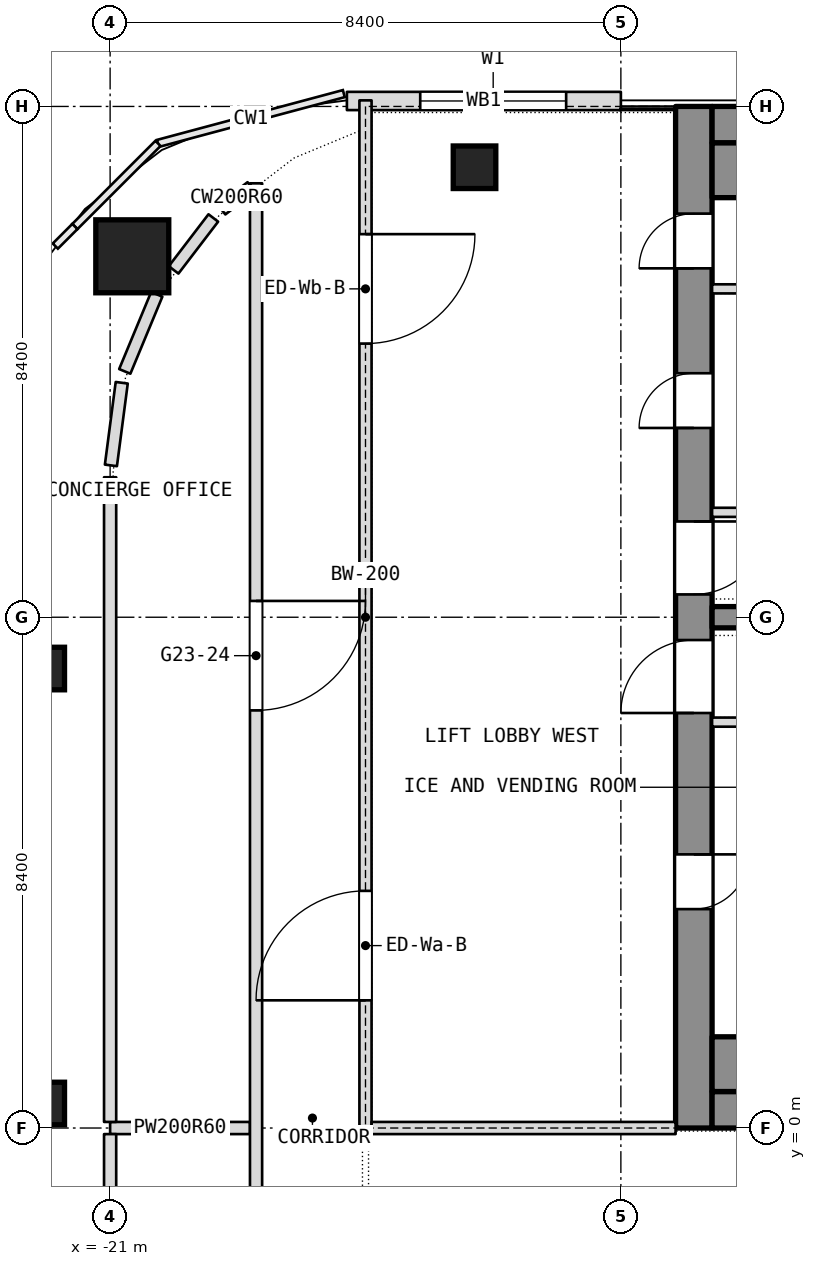
"""IFC4 building model, lengths in metres.
Left out: names, types, materials, properties, quantities, classifications, styles, units other than length and angle.
Written with IfcOpenShell. Run it as: python <this file> out.ifc"""

import sys

from ifc_helpers import new_model, si_unit, direction, frame, frame_2d, origin, origin_2d, place, context, subcontext, project, spatial, rectangle, extrude, element, fill, save


model = new_model("IFC4")
c1 = context("Model", 3, precision=1e-05, world=origin(), true_north=direction((0.0, 1.0)))
c2 = subcontext(c1, "Body", "Model", "MODEL_VIEW")
j1 = project(units=[si_unit("LENGTHUNIT", "METRE"), si_unit("PLANEANGLEUNIT", "RADIAN")], contexts=[c1])
p1 = place(None, origin())
s1 = spatial("IfcSite", under=j1, at=p1, CompositionType="ELEMENT")
p2 = place(p1, origin())
s2 = spatial("IfcBuilding", under=s1, at=p2, CompositionType="ELEMENT")
p3 = place(p2, frame((0.0, 0.0, 270.5)))
s3 = spatial("IfcBuildingStorey", under=s2, at=p3, CompositionType="ELEMENT", Elevation=270.5)
p4 = place(p3, frame((-11.4, 0.0, 0.0), z_axis=(0.0, 0.0, 1.0), x_axis=(0.0, 1.0, 0.0)))
e1 = element("IfcWall", 1, at=p4, inside=s3, PredefinedType="SHEAR", context=c2, shape_type="SweptSolid", body=[
    extrude(rectangle(XDim=16.8, YDim=0.6, at=frame_2d((8.4, 0.0))), origin(), (0.0, 0.0, 1.0), 3.6),
])
p5 = place(p4, frame((3.6, 0.0, 0.0)))
e2 = element("IfcOpeningElement", 2, at=p5, cuts=e1, PredefinedType="OPENING", context=c2, shape_type="SweptSolid", body=[
    extrude(rectangle(XDim=0.9, YDim=2.1, at=frame_2d((0.45, 1.05))), frame((0.0, 0.3, 0.0), z_axis=(0.0, -1.0, 0.0), x_axis=(1.0, 0.0, 0.0)), (0.0, 0.0, 1.0), 0.6),
])
p6 = place(p4, frame((6.825, 0.0, 0.0)))
e3 = element("IfcOpeningElement", 3, at=p6, cuts=e1, PredefinedType="OPENING", context=c2, shape_type="SweptSolid", body=[
    extrude(rectangle(XDim=1.2, YDim=2.1, at=frame_2d((0.6, 1.05))), frame((0.0, 0.3, 0.0), z_axis=(0.0, -1.0, 0.0), x_axis=(1.0, 0.0, 0.0)), (0.0, 0.0, 1.0), 0.6),
])
p7 = place(p4, frame((14.137, 0.0, 0.0)))
e4 = element("IfcOpeningElement", 4, at=p7, cuts=e1, PredefinedType="OPENING", context=c2, shape_type="SweptSolid", body=[
    extrude(rectangle(XDim=0.9, YDim=2.1, at=frame_2d((0.45, 1.05))), frame((0.0, 0.3, 0.0), z_axis=(0.0, -1.0, 0.0), x_axis=(1.0, 0.0, 0.0)), (0.0, 0.0, 1.0), 0.6),
])
p8 = place(p4, frame((11.512, 0.0, 0.0)))
e5 = element("IfcOpeningElement", 5, at=p8, cuts=e1, PredefinedType="OPENING", context=c2, shape_type="SweptSolid", body=[
    extrude(rectangle(XDim=0.9, YDim=2.1, at=frame_2d((0.45, 1.05))), frame((0.0, 0.3, 0.0), z_axis=(0.0, -1.0, 0.0), x_axis=(1.0, 0.0, 0.0)), (0.0, 0.0, 1.0), 0.6),
])
p9 = place(p4, frame((8.775, 0.0, 0.0)))
e6 = element("IfcOpeningElement", 6, at=p9, cuts=e1, PredefinedType="OPENING", context=c2, shape_type="SweptSolid", body=[
    extrude(rectangle(XDim=1.2, YDim=2.1, at=frame_2d((0.6, 1.05))), frame((0.0, 0.3, 0.0), z_axis=(0.0, -1.0, 0.0), x_axis=(1.0, 0.0, 0.0)), (0.0, 0.0, 1.0), 0.6),
])
for number, where, z_axis, x_axis in (
    (7, (-11.1, 0.3, 0.0), (0.0, 0.0, 1.0), (1.0, 0.0, 0.0)),
    (8, (-11.1, 16.5, 0.0), (0.0, 0.0, 1.0), (1.0, 0.0, 0.0)),
):
    element("IfcWall", number, at=place(p3, frame(where, z_axis=z_axis, x_axis=x_axis)), inside=s3, PredefinedType="SHEAR", context=c2, shape_type="SweptSolid", body=[
        extrude(rectangle(XDim=22.2, YDim=0.6, at=frame_2d((11.1, 0.0))), origin(), (0.0, 0.0, 1.0), 3.6),
    ])
p10 = place(p3, frame((-11.1, 8.4, 0.0), z_axis=(0.0, 0.0, 1.0), x_axis=(1.0, 0.0, 0.0)))
e9 = element("IfcWall", 9, at=p10, inside=s3, PredefinedType="SHEAR", context=c2, shape_type="SweptSolid", body=[
    extrude(rectangle(XDim=6.725, YDim=0.35, at=frame_2d((3.363, 0.0))), origin(), (0.0, 0.0, 1.0), 3.6),
])
p11 = place(p3, frame((-20.635, 14.335, 0.0), z_axis=(0.0, 0.0, 1.0), x_axis=(1.0, 0.0, 0.0)))
e10 = element("IfcColumn", 10, at=p11, inside=s3, PredefinedType="COLUMN", context=c2, shape_type="SweptSolid", body=[
    extrude(rectangle(XDim=1.2, YDim=1.2, at=origin_2d()), origin(), (0.0, 0.0, 1.0), 3.6),
])
for number, where, z_axis, x_axis in (
    (11, (-22.1, 0.403, 0.0), (0.0, 0.0, 1.0), (1.0, 0.0, 0.0)),
    (12, (-22.1, 7.556, 0.0), (0.0, 0.0, 1.0), (1.0, 0.0, 0.0)),
    (13, (-15.007, 15.8, 0.0), (0.0, 0.0, 1.0), (1.0, 0.0, 0.0)),
):
    element("IfcColumn", number, at=place(p3, frame(where, z_axis=z_axis, x_axis=x_axis)), inside=s3, PredefinedType="COLUMN", context=c2, shape_type="SweptSolid", body=[
        extrude(rectangle(XDim=0.7, YDim=0.7, at=origin_2d()), origin(), (0.0, 0.0, 1.0), 3.6),
    ])
p12 = place(p3, frame((-21.0, 0.0, 0.0), z_axis=(0.0, 0.0, 1.0), x_axis=(1.0, 0.0, 0.0)))
e14 = element("IfcWall", 14, at=p12, inside=s3, PredefinedType="PARTITIONING", context=c2, shape_type="SweptSolid", body=[
    extrude(rectangle(XDim=2.3, YDim=0.2, at=frame_2d((1.15, 0.0))), origin(), (0.0, 0.0, 1.0), 3.0),
])
p13 = place(p3, frame((-18.6, -11.8, 0.0), z_axis=(0.0, 0.0, 1.0), x_axis=(0.0, 1.0, 0.0)))
e15 = element("IfcWall", 15, at=p13, inside=s3, PredefinedType="PARTITIONING", context=c2, shape_type="SweptSolid", body=[
    extrude(rectangle(XDim=27.336, YDim=0.2, at=frame_2d((13.668, 0.0))), origin(), (0.0, 0.0, 1.0), 3.34),
])
p14 = place(p13, frame((18.668, 0.0, 0.0)))
e16 = element("IfcOpeningElement", 16, at=p14, cuts=e15, PredefinedType="OPENING", context=c2, shape_type="SweptSolid", body=[
    extrude(rectangle(XDim=1.8, YDim=2.1, at=frame_2d((0.9, 1.05))), frame((0.0, 0.1, 0.0), z_axis=(0.0, -1.0, 0.0), x_axis=(1.0, 0.0, 0.0)), (0.0, 0.0, 1.0), 0.2),
])
p15 = place(p13, frame((5.45, 0.0, 0.0)))
e17 = element("IfcOpeningElement", 17, at=p15, cuts=e15, PredefinedType="OPENING", context=c2, shape_type="SweptSolid", body=[
    extrude(rectangle(XDim=1.0, YDim=2.1, at=frame_2d((0.5, 1.05))), frame((0.0, 0.1, 0.0), z_axis=(0.0, -1.0, 0.0), x_axis=(1.0, 0.0, 0.0)), (0.0, 0.0, 1.0), 0.2),
])
p16 = place(p3, frame((-21.0, -11.6, 0.0), z_axis=(0.0, 0.0, 1.0), x_axis=(0.0, 1.0, 0.0)))
e18 = element("IfcWall", 18, at=p16, inside=s3, PredefinedType="PARTITIONING", context=c2, shape_type="SweptSolid", body=[
    extrude(rectangle(XDim=11.5, YDim=0.2, at=frame_2d((5.75, 0.0))), origin(), (0.0, 0.0, 1.0), 3.34),
])
p17 = place(p3, frame((-21.0, 0.1, 0.0), z_axis=(0.0, 0.0, 1.0), x_axis=(0.0, 1.0, 0.0)))
e19 = element("IfcWall", 19, at=p17, inside=s3, PredefinedType="PARTITIONING", context=c2, shape_type="SweptSolid", body=[
    extrude(rectangle(XDim=10.602, YDim=0.2, at=frame_2d((5.301, 0.0))), origin(), (0.0, 0.0, 1.0), 3.34),
])
p18 = place(p3, frame((-20.987, 10.897, 0.0), z_axis=(0.0, 0.0, 1.0), x_axis=(0.129841713905, 0.991534734303, 0.0)))
e20 = element("IfcWall", 20, at=p18, inside=s3, PredefinedType="PARTITIONING", context=c2, shape_type="SweptSolid", body=[
    extrude(rectangle(XDim=1.371, YDim=0.2, at=frame_2d((0.686, 0.0))), origin(), (0.0, 0.0, 1.0), 3.34),
])
p19 = place(p3, frame((-19.166, 15.103, 0.0), z_axis=(0.0, 0.0, 1.0), x_axis=(0.794663000987, 0.607050833837, 0.0)))
e21 = element("IfcWall", 21, at=p19, inside=s3, PredefinedType="PARTITIONING", context=c2, shape_type="SweptSolid", body=[
    extrude(rectangle(XDim=0.613, YDim=0.2, at=frame_2d((0.306, 0.0))), origin(), (0.0, 0.0, 1.0), 3.34),
])
p20 = place(p3, frame((-20.759, 12.443, 0.0), z_axis=(0.0, 0.0, 1.0), x_axis=(0.383540942064, 0.923523873953, 0.0)))
e22 = element("IfcWall", 22, at=p20, inside=s3, PredefinedType="PARTITIONING", context=c2, shape_type="SweptSolid", body=[
    extrude(rectangle(XDim=1.372, YDim=0.2, at=frame_2d((0.686, 0.0))), origin(), (0.0, 0.0, 1.0), 3.34),
])
p21 = place(p3, frame((-19.956, 14.112, 0.0), z_axis=(0.0, 0.0, 1.0), x_axis=(0.607458536541, 0.794351387223, 0.0)))
e23 = element("IfcWall", 23, at=p21, inside=s3, PredefinedType="PARTITIONING", context=c2, shape_type="SweptSolid", body=[
    extrude(rectangle(XDim=1.075, YDim=0.2, at=frame_2d((0.538, 0.0))), origin(), (0.0, 0.0, 1.0), 3.34),
])
p22 = place(p3, frame((-12.6, 16.89, 0.0), z_axis=(0.0, 0.0, 1.0), x_axis=(-1.0, 0.0, 0.0)))
e24 = element("IfcWall", 24, at=p22, inside=s3, PredefinedType="NOTDEFINED", context=c2, shape_type="SweptSolid", body=[
    extrude(rectangle(XDim=4.506, YDim=0.3, at=frame_2d((2.253, 0.0))), origin(), (0.0, 0.0, 1.0), 3.6),
])
p23 = place(p22, frame((0.9, 0.0, 0.9)))
e25 = element("IfcOpeningElement", 25, at=p23, cuts=e24, PredefinedType="OPENING", context=c2, shape_type="SweptSolid", body=[
    extrude(rectangle(XDim=2.4, YDim=2.1, at=frame_2d((1.2, 1.05))), frame((0.0, 0.15, 0.0), z_axis=(0.0, -1.0, 0.0), x_axis=(1.0, 0.0, 0.0)), (0.0, 0.0, 1.0), 0.3),
])
for number, where, z_axis, x_axis in (
    (26, (-11.1, 1.05, 0.0), (0.0, 0.0, 1.0), (1.0, 0.0, 0.0)),
    (27, (-11.1, 15.75, 0.0), (0.0, 0.0, 1.0), (1.0, 0.0, 0.0)),
):
    element("IfcWall", number, at=place(p3, frame(where, z_axis=z_axis, x_axis=x_axis)), inside=s3, PredefinedType="PARTITIONING", context=c2, shape_type="SweptSolid", body=[
        extrude(rectangle(XDim=22.2, YDim=0.9, at=frame_2d((11.1, 0.0))), origin(), (0.0, 0.0, 1.0), 3.34),
    ])
for number, where, z_axis, x_axis in (
    (28, (-11.1, 6.675, 0.0), (0.0, 0.0, 1.0), (1.0, 0.0, 0.0)),
    (29, (-11.1, 10.125, 0.0), (0.0, 0.0, 1.0), (1.0, 0.0, 0.0)),
    (30, (-11.1, 13.8, 0.0), (0.0, 0.0, 1.0), (1.0, 0.0, 0.0)),
):
    element("IfcWall", number, at=place(p3, frame(where, z_axis=z_axis, x_axis=x_axis)), inside=s3, PredefinedType="PARTITIONING", context=c2, shape_type="SweptSolid", body=[
        extrude(rectangle(XDim=2.1, YDim=0.15, at=frame_2d((1.05, 0.0))), origin(), (0.0, 0.0, 1.0), 3.34),
    ])
p24 = place(p3, frame((-16.8, -0.1, 0.0), z_axis=(0.0, 0.0, 1.0), x_axis=(0.0, 1.0, 0.0)))
e31 = element("IfcWall", 31, at=p24, inside=s3, PredefinedType="PARTITIONING", context=c2, shape_type="SweptSolid", body=[
    extrude(rectangle(XDim=17.0, YDim=0.2, at=frame_2d((8.5, 0.0))), origin(), (0.0, 0.0, 1.0), 3.34),
])
p25 = place(p24, frame((2.2, 0.0, 0.0)))
e32 = element("IfcOpeningElement", 32, at=p25, cuts=e31, PredefinedType="OPENING", context=c2, shape_type="SweptSolid", body=[
    extrude(rectangle(XDim=1.8, YDim=2.1, at=frame_2d((0.9, 1.05))), frame((0.0, 0.1, 0.0), z_axis=(0.0, -1.0, 0.0), x_axis=(1.0, 0.0, 0.0)), (0.0, 0.0, 1.0), 0.2),
])
p26 = place(p24, frame((13.0, 0.0, 0.0)))
e33 = element("IfcOpeningElement", 33, at=p26, cuts=e31, PredefinedType="OPENING", context=c2, shape_type="SweptSolid", body=[
    extrude(rectangle(XDim=1.8, YDim=2.1, at=frame_2d((0.9, 1.05))), frame((0.0, 0.1, 0.0), z_axis=(0.0, -1.0, 0.0), x_axis=(1.0, 0.0, 0.0)), (0.0, 0.0, 1.0), 0.2),
])
p27 = place(p3, frame((-16.7, 0.0, 0.0), z_axis=(0.0, 0.0, 1.0), x_axis=(1.0, 0.0, 0.0)))
e34 = element("IfcWall", 34, at=p27, inside=s3, PredefinedType="PARTITIONING", context=c2, shape_type="SweptSolid", body=[
    extrude(rectangle(XDim=5.0, YDim=0.2, at=frame_2d((2.5, 0.0))), origin(), (0.0, 0.0, 1.0), 3.0),
])
p28 = place(p14, origin())
e35 = element("IfcDoor", 35, at=p28, inside=s3, OperationType="DOUBLE_DOOR_SINGLE_SWING", PredefinedType="DOOR", context=c2, shape_type="SweptSolid", body=[
    extrude(rectangle(XDim=1.8, YDim=2.1, at=frame_2d((0.9, 1.05))), frame((0.0, 0.025, 0.0), z_axis=(0.0, -1.0, 0.0), x_axis=(1.0, 0.0, 0.0)), (0.0, 0.0, 1.0), 0.05),
])
fill(e16, e35)
p29 = place(p23, origin())
e36 = element("IfcWindow", 36, at=p29, inside=s3, PartitioningType="SINGLE_PANEL", PredefinedType="WINDOW", context=c2, shape_type="SweptSolid", body=[
    extrude(rectangle(XDim=2.4, YDim=2.1, at=frame_2d((1.2, 1.05))), frame((0.0, 0.03, 0.0), z_axis=(0.0, -1.0, 0.0), x_axis=(1.0, 0.0, 0.0)), (0.0, 0.0, 1.0), 0.06),
])
fill(e25, e36)
p30 = place(p5, origin())
e37 = element("IfcDoor", 37, at=p30, inside=s3, OperationType="SINGLE_SWING_LEFT", PredefinedType="DOOR", context=c2, shape_type="SweptSolid", body=[
    extrude(rectangle(XDim=0.9, YDim=2.1, at=frame_2d((0.45, 1.05))), frame((0.0, 0.025, 0.0), z_axis=(0.0, -1.0, 0.0), x_axis=(1.0, 0.0, 0.0)), (0.0, 0.0, 1.0), 0.05),
])
fill(e2, e37)
p31 = place(p6, origin())
e38 = element("IfcDoor", 38, at=p31, inside=s3, OperationType="SINGLE_SWING_LEFT", PredefinedType="DOOR", context=c2, shape_type="SweptSolid", body=[
    extrude(rectangle(XDim=1.2, YDim=2.1, at=frame_2d((0.6, 1.05))), frame((0.0, 0.025, 0.0), z_axis=(0.0, -1.0, 0.0), x_axis=(1.0, 0.0, 0.0)), (0.0, 0.0, 1.0), 0.05),
])
fill(e3, e38)
p32 = place(p7, origin())
e39 = element("IfcDoor", 39, at=p32, inside=s3, OperationType="SINGLE_SWING_LEFT", PredefinedType="DOOR", context=c2, shape_type="SweptSolid", body=[
    extrude(rectangle(XDim=0.9, YDim=2.1, at=frame_2d((0.45, 1.05))), frame((0.0, 0.025, 0.0), z_axis=(0.0, -1.0, 0.0), x_axis=(1.0, 0.0, 0.0)), (0.0, 0.0, 1.0), 0.05),
])
fill(e4, e39)
p33 = place(p8, origin())
e40 = element("IfcDoor", 40, at=p33, inside=s3, OperationType="SINGLE_SWING_LEFT", PredefinedType="DOOR", context=c2, shape_type="SweptSolid", body=[
    extrude(rectangle(XDim=0.9, YDim=2.1, at=frame_2d((0.45, 1.05))), frame((0.0, 0.025, 0.0), z_axis=(0.0, -1.0, 0.0), x_axis=(1.0, 0.0, 0.0)), (0.0, 0.0, 1.0), 0.05),
])
fill(e5, e40)
p34 = place(p9, origin())
e41 = element("IfcDoor", 41, at=p34, inside=s3, OperationType="SINGLE_SWING_LEFT", PredefinedType="DOOR", context=c2, shape_type="SweptSolid", body=[
    extrude(rectangle(XDim=1.2, YDim=2.1, at=frame_2d((0.6, 1.05))), frame((0.0, 0.025, 0.0), z_axis=(0.0, -1.0, 0.0), x_axis=(1.0, 0.0, 0.0)), (0.0, 0.0, 1.0), 0.05),
])
fill(e6, e41)
p35 = place(p25, origin())
e42 = element("IfcDoor", 42, at=p35, inside=s3, OperationType="DOUBLE_DOOR_SINGLE_SWING", PredefinedType="DOOR", context=c2, shape_type="SweptSolid", body=[
    extrude(rectangle(XDim=1.8, YDim=2.1, at=frame_2d((0.9, 1.05))), frame((0.0, 0.025, 0.0), z_axis=(0.0, -1.0, 0.0), x_axis=(1.0, 0.0, 0.0)), (0.0, 0.0, 1.0), 0.05),
])
fill(e32, e42)
p36 = place(p26, origin())
e43 = element("IfcDoor", 43, at=p36, inside=s3, OperationType="DOUBLE_DOOR_SINGLE_SWING", PredefinedType="DOOR", context=c2, shape_type="SweptSolid", body=[
    extrude(rectangle(XDim=1.8, YDim=2.1, at=frame_2d((0.9, 1.05))), frame((0.0, 0.025, 0.0), z_axis=(0.0, -1.0, 0.0), x_axis=(1.0, 0.0, 0.0)), (0.0, 0.0, 1.0), 0.05),
])
fill(e33, e43)
save(model, sys.argv[1])
